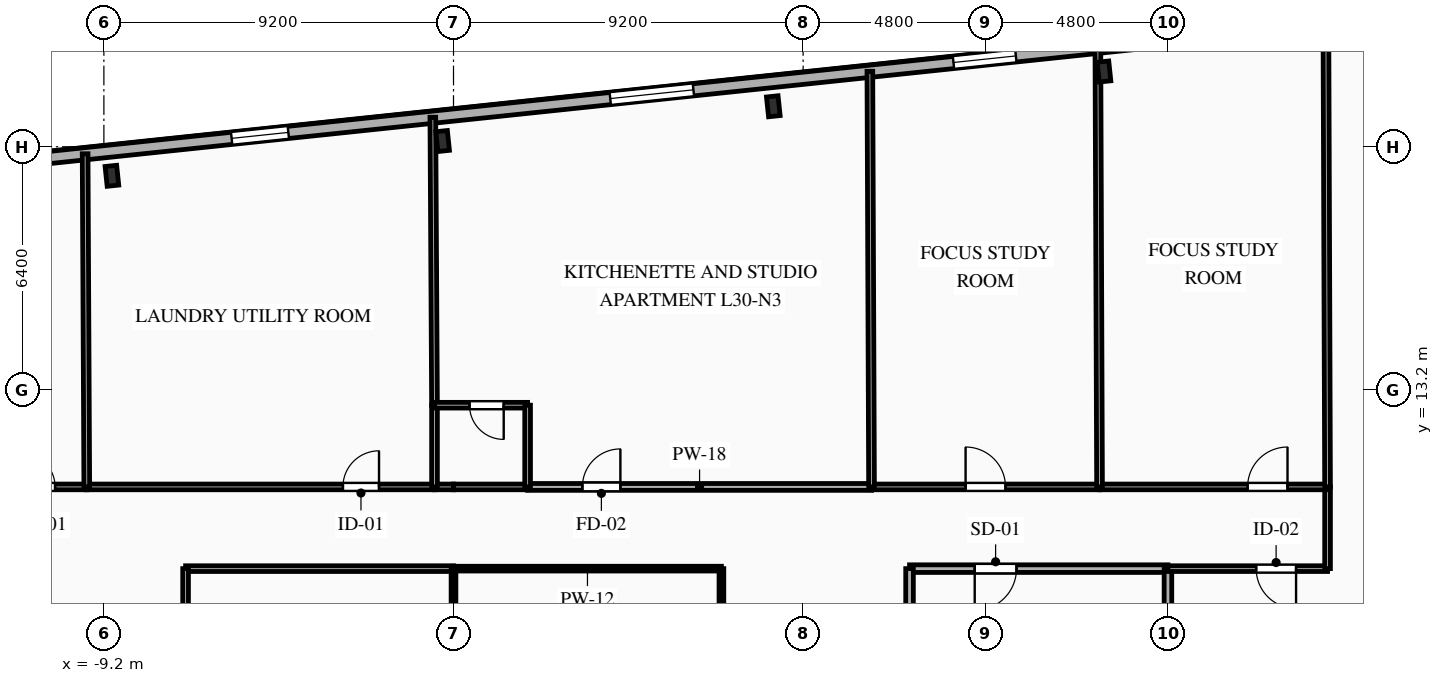
"""IFC4 building model, lengths in metres.
Left out: names, types, materials, properties, quantities, classifications, styles, units other than length and angle.
Written with IfcOpenShell. Run it as: python <this file> out.ifc"""

import sys

from ifc_helpers import new_model, si_unit, direction, frame, frame_2d, origin, origin_2d, place, context, subcontext, project, spatial, rectangle, i_section, extrude, element, fill, save


model = new_model("IFC4")
c1 = context("Model", 3, precision=1e-05, world=origin(), true_north=direction((0.0, 1.0)))
c2 = subcontext(c1, "Body", "Model", "MODEL_VIEW")
j1 = project(units=[si_unit("LENGTHUNIT", "METRE"), si_unit("PLANEANGLEUNIT", "RADIAN")], contexts=[c1])
p1 = place(None, origin())
s1 = spatial("IfcSite", under=j1, at=p1, CompositionType="ELEMENT")
p2 = place(p1, origin())
s2 = spatial("IfcBuilding", under=s1, at=p2, CompositionType="ELEMENT")
p3 = place(p2, frame((0.0, 0.0, 109.15)))
s3 = spatial("IfcBuildingStorey", under=s2, at=p3, CompositionType="ELEMENT", Elevation=109.15)
for number, where, z_axis, x_axis in (
    (1, (17.117, 21.58, 0.0), (0.0, 0.0, 1.0), (0.995, 0.105, 0.0)),
    (2, (8.415, 20.666, 0.0), (0.0, 0.0, 1.0), (0.995, 0.105, 0.0)),
    (3, (-0.287, 19.751, 0.0), (0.0, 0.0, 1.0), (0.995, 0.105, 0.0)),
    (4, (-8.989, 18.836, 0.0), (0.0, 0.0, 1.0), (0.995, 0.105, 0.0)),
):
    element("IfcColumn", number, at=place(p3, frame(where, z_axis=z_axis, x_axis=x_axis)), inside=s3, PredefinedType="COLUMN", context=c2, shape_type="SweptSolid", body=[
        extrude(i_section(OverallWidth=0.306, OverallDepth=0.524, WebThickness=0.021, FlangeThickness=0.04, FilletRadius=0.027, at=origin_2d()), origin(), (0.0, 0.0, 1.0), 3.35),
    ])
p4 = place(p3, frame((-27.107, 17.586, 0.0), z_axis=(0.0, 0.0, 1.0), x_axis=(0.994521628355, 0.104531003701, 0.0)))
e5 = element("IfcWall", 5, at=p4, inside=s3, PredefinedType="SOLIDWALL", context=c2, shape_type="SweptSolid", body=[
    extrude(rectangle(XDim=53.8, YDim=0.32, at=frame_2d((26.9, 0.0))), origin(), (0.0, 0.0, 1.0), 3.045),
])
p5 = place(p4, frame((1.532, 0.0, 0.85)))
e6 = element("IfcOpeningElement", 6, at=p5, cuts=e5, PredefinedType="OPENING", context=c2, shape_type="SweptSolid", body=[
    extrude(rectangle(XDim=1.5, YDim=1.85, at=frame_2d((0.75, 0.925))), frame((0.0, 0.17, 0.0), z_axis=(0.0, -1.0, 0.0), x_axis=(1.0, 0.0, 0.0)), (0.0, 0.0, 1.0), 0.34),
])
p6 = place(p4, frame((6.02, 0.0, 0.85)))
e7 = element("IfcOpeningElement", 7, at=p6, cuts=e5, PredefinedType="OPENING", context=c2, shape_type="SweptSolid", body=[
    extrude(rectangle(XDim=1.65, YDim=1.85, at=frame_2d((0.825, 0.925))), frame((0.0, 0.17, 0.0), z_axis=(0.0, -1.0, 0.0), x_axis=(1.0, 0.0, 0.0)), (0.0, 0.0, 1.0), 0.34),
])
p7 = place(p4, frame((11.584, 0.0, 0.85)))
e8 = element("IfcOpeningElement", 8, at=p7, cuts=e5, PredefinedType="OPENING", context=c2, shape_type="SweptSolid", body=[
    extrude(rectangle(XDim=1.65, YDim=1.85, at=frame_2d((0.825, 0.925))), frame((0.0, 0.17, 0.0), z_axis=(0.0, -1.0, 0.0), x_axis=(1.0, 0.0, 0.0)), (0.0, 0.0, 1.0), 0.34),
])
p8 = place(p4, frame((21.386, 0.0, 0.85)))
e9 = element("IfcOpeningElement", 9, at=p8, cuts=e5, PredefinedType="OPENING", context=c2, shape_type="SweptSolid", body=[
    extrude(rectangle(XDim=1.5, YDim=1.85, at=frame_2d((0.75, 0.925))), frame((0.0, 0.17, 0.0), z_axis=(0.0, -1.0, 0.0), x_axis=(1.0, 0.0, 0.0)), (0.0, 0.0, 1.0), 0.34),
])
p9 = place(p4, frame((31.404, 0.0, 0.85)))
e10 = element("IfcOpeningElement", 10, at=p9, cuts=e5, PredefinedType="OPENING", context=c2, shape_type="SweptSolid", body=[
    extrude(rectangle(XDim=2.2, YDim=1.85, at=frame_2d((1.1, 0.925))), frame((0.0, 0.17, 0.0), z_axis=(0.0, -1.0, 0.0), x_axis=(1.0, 0.0, 0.0)), (0.0, 0.0, 1.0), 0.34),
])
p10 = place(p4, frame((40.486, 0.0, 0.85)))
e11 = element("IfcOpeningElement", 11, at=p10, cuts=e5, PredefinedType="OPENING", context=c2, shape_type="SweptSolid", body=[
    extrude(rectangle(XDim=1.65, YDim=1.85, at=frame_2d((0.825, 0.925))), frame((0.0, 0.17, 0.0), z_axis=(0.0, -1.0, 0.0), x_axis=(1.0, 0.0, 0.0)), (0.0, 0.0, 1.0), 0.34),
])
p11 = place(p4, frame((46.53, 0.0, 0.85)))
e12 = element("IfcOpeningElement", 12, at=p11, cuts=e5, PredefinedType="OPENING", context=c2, shape_type="SweptSolid", body=[
    extrude(rectangle(XDim=1.65, YDim=1.85, at=frame_2d((0.825, 0.925))), frame((0.0, 0.17, 0.0), z_axis=(0.0, -1.0, 0.0), x_axis=(1.0, 0.0, 0.0)), (0.0, 0.0, 1.0), 0.34),
])
p12 = place(p4, frame((51.054, 0.0, 0.85)))
e13 = element("IfcOpeningElement", 13, at=p12, cuts=e5, PredefinedType="OPENING", context=c2, shape_type="SweptSolid", body=[
    extrude(rectangle(XDim=1.65, YDim=1.85, at=frame_2d((0.825, 0.925))), frame((0.0, 0.17, 0.0), z_axis=(0.0, -1.0, 0.0), x_axis=(1.0, 0.0, 0.0)), (0.0, 0.0, 1.0), 0.34),
])
p13 = place(p3, frame((18.8, 8.5, 0.0), z_axis=(0.0, 0.0, 1.0), x_axis=(-1.0, 0.0, 0.0)))
e14 = element("IfcWall", 14, at=p13, inside=s3, PredefinedType="PARTITIONING", context=c2, shape_type="SweptSolid", body=[
    extrude(rectangle(XDim=6.8, YDim=0.2, at=frame_2d((3.4, 0.0))), origin(), (0.0, 0.0, 1.0), 3.045),
])
p14 = place(p13, frame((3.985, 0.0, 0.0)))
e15 = element("IfcOpeningElement", 15, at=p14, cuts=e14, PredefinedType="OPENING", context=c2, shape_type="SweptSolid", body=[
    extrude(rectangle(XDim=1.1, YDim=2.15, at=frame_2d((0.55, 1.075))), frame((0.0, 0.11, 0.0), z_axis=(0.0, -1.0, 0.0), x_axis=(1.0, 0.0, 0.0)), (0.0, 0.0, 1.0), 0.22),
])
p15 = place(p3, frame((12.0, 8.5, 0.0), z_axis=(0.0, 0.0, 1.0), x_axis=(0.0, -1.0, 0.0)))
e16 = element("IfcWall", 16, at=p15, inside=s3, PredefinedType="PARTITIONING", context=c2, shape_type="SweptSolid", body=[
    extrude(rectangle(XDim=2.9, YDim=0.2, at=frame_2d((1.45, 0.0))), origin(), (0.0, 0.0, 1.0), 3.045),
])
p16 = place(p3, frame((18.8, 5.6, 0.0), z_axis=(0.0, 0.0, 1.0), x_axis=(0.0, 1.0, 0.0)))
e17 = element("IfcWall", 17, at=p16, inside=s3, PredefinedType="PARTITIONING", context=c2, shape_type="SweptSolid", body=[
    extrude(rectangle(XDim=2.9, YDim=0.2, at=frame_2d((1.45, 0.0))), origin(), (0.0, 0.0, 1.0), 2.53),
])
p17 = place(p3, frame((-12.0, 10.65, 0.0), z_axis=(0.0, 0.0, 1.0), x_axis=(1.0, 0.0, 0.0)))
e18 = element("IfcWall", 18, at=p17, inside=s3, PredefinedType="PLUMBINGWALL", context=c2, shape_type="SweptSolid", body=[
    extrude(rectangle(XDim=2.35, YDim=0.15, at=frame_2d((1.175, 0.0))), origin(), (0.0, 0.0, 1.0), 3.045),
])
p18 = place(p17, frame((0.616, 0.0, 0.0)))
e19 = element("IfcOpeningElement", 19, at=p18, cuts=e18, PredefinedType="OPENING", context=c2, shape_type="SweptSolid", body=[
    extrude(rectangle(XDim=0.9, YDim=2.1, at=frame_2d((0.45, 1.05))), frame((0.0, 0.085, 0.0), z_axis=(0.0, -1.0, 0.0), x_axis=(1.0, 0.0, 0.0)), (0.0, 0.0, 1.0), 0.17),
])
p19 = place(p3, frame((-9.65, 10.65, 0.0), z_axis=(0.0, 0.0, 1.0), x_axis=(1.0, 0.0, 0.0)))
e20 = element("IfcWall", 20, at=p19, inside=s3, PredefinedType="PARTITIONING", context=c2, shape_type="SweptSolid", body=[
    extrude(rectangle(XDim=9.15, YDim=0.15, at=frame_2d((4.575, 0.0))), origin(), (0.0, 0.0, 1.0), 3.045),
])
p20 = place(p19, frame((6.74, 0.0, 0.0)))
e21 = element("IfcOpeningElement", 21, at=p20, cuts=e20, PredefinedType="OPENING", context=c2, shape_type="SweptSolid", body=[
    extrude(rectangle(XDim=0.95, YDim=2.1, at=frame_2d((0.475, 1.05))), frame((0.0, 0.085, 0.0), z_axis=(0.0, -1.0, 0.0), x_axis=(1.0, 0.0, 0.0)), (0.0, 0.0, 1.0), 0.17),
])
p21 = place(p3, frame((-0.5, 10.65, 0.0), z_axis=(0.0, 0.0, 1.0), x_axis=(1.0, 0.0, 0.0)))
e22 = element("IfcWall", 22, at=p21, inside=s3, PredefinedType="PLUMBINGWALL", context=c2, shape_type="SweptSolid", body=[
    extrude(rectangle(XDim=0.5, YDim=0.15, at=frame_2d((0.25, 0.0))), origin(), (0.0, 0.0, 1.0), 3.045),
])
p22 = place(p3, frame((0.0, 8.5, 0.0), z_axis=(0.0, 0.0, 1.0), x_axis=(-1.0, 0.0, 0.0)))
e23 = element("IfcWall", 23, at=p22, inside=s3, PredefinedType="PARTITIONING", context=c2, shape_type="SweptSolid", body=[
    extrude(rectangle(XDim=7.05, YDim=0.15, at=frame_2d((3.525, 0.0))), origin(), (0.0, 0.0, 1.0), 3.045),
])
p23 = place(p3, frame((23.0, 8.5, 0.0), z_axis=(0.0, 0.0, 1.0), x_axis=(-1.0, 0.0, 0.0)))
e24 = element("IfcWall", 24, at=p23, inside=s3, PredefinedType="PARTITIONING", context=c2, shape_type="SweptSolid", body=[
    extrude(rectangle(XDim=4.2, YDim=0.15, at=frame_2d((2.1, 0.0))), origin(), (0.0, 0.0, 1.0), 3.045),
])
p24 = place(p23, frame((0.829, 0.0, 0.0)))
e25 = element("IfcOpeningElement", 25, at=p24, cuts=e24, PredefinedType="OPENING", context=c2, shape_type="SweptSolid", body=[
    extrude(rectangle(XDim=1.05, YDim=2.15, at=frame_2d((0.525, 1.075))), frame((0.0, 0.085, 0.0), z_axis=(0.0, -1.0, 0.0), x_axis=(1.0, 0.0, 0.0)), (0.0, 0.0, 1.0), 0.17),
])
p25 = place(p3, frame((23.0, 10.65, 0.0), z_axis=(0.0, 0.0, 1.0), x_axis=(0.0, -1.0, 0.0)))
e26 = element("IfcWall", 26, at=p25, inside=s3, PredefinedType="PARTITIONING", context=c2, shape_type="SweptSolid", body=[
    extrude(rectangle(XDim=2.15, YDim=0.15, at=frame_2d((1.075, 0.0))), origin(), (0.0, 0.0, 1.0), 3.045),
])
p26 = place(p3, frame((1.95, 10.65, 0.0), z_axis=(0.0, 0.0, 1.0), x_axis=(1.0, 0.0, 0.0)))
e27 = element("IfcWall", 27, at=p26, inside=s3, PredefinedType="PARTITIONING", context=c2, shape_type="SweptSolid", body=[
    extrude(rectangle(XDim=9.05, YDim=0.18, at=frame_2d((4.525, 0.0))), origin(), (0.0, 0.0, 1.0), 3.045),
])
p27 = place(p26, frame((1.441, 0.0, 0.0)))
e28 = element("IfcOpeningElement", 28, at=p27, cuts=e27, PredefinedType="OPENING", context=c2, shape_type="SweptSolid", body=[
    extrude(rectangle(XDim=1.0, YDim=2.15, at=frame_2d((0.5, 1.075))), frame((0.0, 0.1, 0.0), z_axis=(0.0, -1.0, 0.0), x_axis=(1.0, 0.0, 0.0)), (0.0, 0.0, 1.0), 0.2),
])
p28 = place(p3, frame((0.0, 10.65, 0.0), z_axis=(0.0, 0.0, 1.0), x_axis=(1.0, 0.0, 0.0)))
e29 = element("IfcWall", 29, at=p28, inside=s3, PredefinedType="PLUMBINGWALL", context=c2, shape_type="SweptSolid", body=[
    extrude(rectangle(XDim=1.95, YDim=0.15, at=frame_2d((0.975, 0.0))), origin(), (0.0, 0.0, 1.0), 3.045),
])
p29 = place(p3, frame((11.0, 10.65, 0.0), z_axis=(0.0, 0.0, 1.0), x_axis=(1.0, 0.0, 0.0)))
e30 = element("IfcWall", 30, at=p29, inside=s3, PredefinedType="PARTITIONING", context=c2, shape_type="SweptSolid", body=[
    extrude(rectangle(XDim=6.0, YDim=0.15, at=frame_2d((3.0, 0.0))), origin(), (0.0, 0.0, 1.0), 3.045),
])
p30 = place(p29, frame((2.475, 0.0, 0.0)))
e31 = element("IfcOpeningElement", 31, at=p30, cuts=e30, PredefinedType="OPENING", context=c2, shape_type="SweptSolid", body=[
    extrude(rectangle(XDim=1.05, YDim=2.15, at=frame_2d((0.525, 1.075))), frame((0.0, 0.085, 0.0), z_axis=(0.0, -1.0, 0.0), x_axis=(1.0, 0.0, 0.0)), (0.0, 0.0, 1.0), 0.17),
])
p31 = place(p3, frame((17.0, 10.65, 0.0), z_axis=(0.0, 0.0, 1.0), x_axis=(1.0, 0.0, 0.0)))
e32 = element("IfcWall", 32, at=p31, inside=s3, PredefinedType="PARTITIONING", context=c2, shape_type="SweptSolid", body=[
    extrude(rectangle(XDim=6.0, YDim=0.15, at=frame_2d((3.0, 0.0))), origin(), (0.0, 0.0, 1.0), 3.045),
])
p32 = place(p31, frame((3.896, 0.0, 0.0)))
e33 = element("IfcOpeningElement", 33, at=p32, cuts=e32, PredefinedType="OPENING", context=c2, shape_type="SweptSolid", body=[
    extrude(rectangle(XDim=1.05, YDim=2.15, at=frame_2d((0.525, 1.075))), frame((0.0, 0.085, 0.0), z_axis=(0.0, -1.0, 0.0), x_axis=(1.0, 0.0, 0.0)), (0.0, 0.0, 1.0), 0.17),
])
p33 = place(p3, frame((7.05, 8.5, 0.0), z_axis=(0.0, 0.0, 1.0), x_axis=(-1.0, 0.0, 0.0)))
e34 = element("IfcWall", 34, at=p33, inside=s3, PredefinedType="PARTITIONING", context=c2, shape_type="SweptSolid", body=[
    extrude(rectangle(XDim=7.05, YDim=0.125, at=frame_2d((3.525, 0.0))), origin(), (0.0, 0.0, 1.0), 3.045),
])
p34 = place(p3, frame((-7.05, 8.5, 0.0), z_axis=(0.0, 0.0, 1.0), x_axis=(0.0, -1.0, 0.0)))
e35 = element("IfcWall", 35, at=p34, inside=s3, PredefinedType="PARTITIONING", context=c2, shape_type="SweptSolid", body=[
    extrude(rectangle(XDim=14.1, YDim=0.15, at=frame_2d((7.05, 0.0))), origin(), (0.0, 0.0, 1.0), 3.045),
])
p35 = place(p34, frame((8.074, 0.0, 0.0)))
e36 = element("IfcOpeningElement", 36, at=p35, cuts=e35, PredefinedType="OPENING", context=c2, shape_type="SweptSolid", body=[
    extrude(rectangle(XDim=0.95, YDim=2.1, at=frame_2d((0.475, 1.05))), frame((0.0, 0.085, 0.0), z_axis=(0.0, -1.0, 0.0), x_axis=(1.0, 0.0, 0.0)), (0.0, 0.0, 1.0), 0.17),
])
p36 = place(p3, frame((7.05, -5.6, 0.0), z_axis=(0.0, 0.0, 1.0), x_axis=(0.0, 1.0, 0.0)))
e37 = element("IfcWall", 37, at=p36, inside=s3, PredefinedType="PARTITIONING", context=c2, shape_type="SweptSolid", body=[
    extrude(rectangle(XDim=14.1, YDim=0.125, at=frame_2d((7.05, 0.0))), origin(), (0.0, 0.0, 1.0), 3.045),
])
p37 = place(p36, frame((5.076, 0.0, 0.0)))
e38 = element("IfcOpeningElement", 38, at=p37, cuts=e37, PredefinedType="OPENING", context=c2, shape_type="SweptSolid", body=[
    extrude(rectangle(XDim=0.95, YDim=2.1, at=frame_2d((0.475, 1.05))), frame((0.0, 0.073, 0.0), z_axis=(0.0, -1.0, 0.0), x_axis=(1.0, 0.0, 0.0)), (0.0, 0.0, 1.0), 0.145),
])
p38 = place(p3, frame((23.0, 10.65, 0.0), z_axis=(0.0, 0.0, 1.0), x_axis=(-0.0036027147, 0.999993510202, 0.0)))
e39 = element("IfcWall", 39, at=p38, inside=s3, PredefinedType="PARTITIONING", context=c2, shape_type="SweptSolid", body=[
    extrude(rectangle(XDim=12.198, YDim=0.15, at=frame_2d((6.099, 0.0))), origin(), (0.0, 0.0, 1.0), 3.045),
])
p39 = place(p3, frame((-9.694, 19.416, 0.0), z_axis=(0.0, 0.0, 1.0), x_axis=(0.005013026743, -0.999987434702, 0.0)))
e40 = element("IfcWall", 40, at=p39, inside=s3, PredefinedType="PLUMBINGWALL", context=c2, shape_type="SweptSolid", body=[
    extrude(rectangle(XDim=8.766, YDim=0.15, at=frame_2d((4.383, 0.0))), origin(), (0.0, 0.0, 1.0), 3.045),
])
p40 = place(p3, frame((-0.544, 20.378, 0.0), z_axis=(0.0, 0.0, 1.0), x_axis=(0.005799245221, -0.999983184236, 0.0)))
e41 = element("IfcWall", 41, at=p40, inside=s3, PredefinedType="PARTITIONING", context=c2, shape_type="SweptSolid", body=[
    extrude(rectangle(XDim=7.578, YDim=0.15, at=frame_2d((3.789, 0.0))), origin(), (0.0, 0.0, 1.0), 3.045),
])
p41 = place(p3, frame((-0.5, 12.8, 0.0), z_axis=(0.0, 0.0, 1.0), x_axis=(0.0, -1.0, 0.0)))
e42 = element("IfcWall", 42, at=p41, inside=s3, PredefinedType="PLUMBINGWALL", context=c2, shape_type="SweptSolid", body=[
    extrude(rectangle(XDim=2.15, YDim=0.15, at=frame_2d((1.075, 0.0))), origin(), (0.0, 0.0, 1.0), 3.045),
])
p42 = place(p3, frame((1.95, 12.8, 0.0), z_axis=(0.0, 0.0, 1.0), x_axis=(-1.0, 0.0, 0.0)))
e43 = element("IfcWall", 43, at=p42, inside=s3, PredefinedType="PLUMBINGWALL", context=c2, shape_type="SweptSolid", body=[
    extrude(rectangle(XDim=2.45, YDim=0.15, at=frame_2d((1.225, 0.0))), origin(), (0.0, 0.0, 1.0), 3.045),
])
p43 = place(p42, frame((0.629, 0.0, 0.0)))
e44 = element("IfcOpeningElement", 44, at=p43, cuts=e43, PredefinedType="OPENING", context=c2, shape_type="SweptSolid", body=[
    extrude(rectangle(XDim=0.9, YDim=2.1, at=frame_2d((0.45, 1.05))), frame((0.0, 0.085, 0.0), z_axis=(0.0, -1.0, 0.0), x_axis=(1.0, 0.0, 0.0)), (0.0, 0.0, 1.0), 0.17),
])
p44 = place(p3, frame((1.95, 10.65, 0.0), z_axis=(0.0, 0.0, 1.0), x_axis=(0.0, 1.0, 0.0)))
e45 = element("IfcWall", 45, at=p44, inside=s3, PredefinedType="PLUMBINGWALL", context=c2, shape_type="SweptSolid", body=[
    extrude(rectangle(XDim=2.15, YDim=0.15, at=frame_2d((1.075, 0.0))), origin(), (0.0, 0.0, 1.0), 3.045),
])
p45 = place(p3, frame((10.956, 21.586, 0.0), z_axis=(0.0, 0.0, 1.0), x_axis=(0.004018183473, -0.999991927068, 0.0)))
e46 = element("IfcWall", 46, at=p45, inside=s3, PredefinedType="PARTITIONING", context=c2, shape_type="SweptSolid", body=[
    extrude(rectangle(XDim=10.937, YDim=0.15, at=frame_2d((5.468, 0.0))), origin(), (0.0, 0.0, 1.0), 3.045),
])
p46 = place(p3, frame((16.956, 22.217, 0.0), z_axis=(0.0, 0.0, 1.0), x_axis=(0.003799124105, -0.999992783302, 0.0)))
e47 = element("IfcWall", 47, at=p46, inside=s3, PredefinedType="PARTITIONING", context=c2, shape_type="SweptSolid", body=[
    extrude(rectangle(XDim=11.567, YDim=0.15, at=frame_2d((5.784, 0.0))), origin(), (0.0, 0.0, 1.0), 2.53),
])
p47 = place(p3, frame((0.0, 8.5, 0.0), z_axis=(0.0, 0.0, 1.0), x_axis=(0.0, -1.0, 0.0)))
e48 = element("IfcWall", 48, at=p47, inside=s3, PredefinedType="PARTITIONING", context=c2, shape_type="SweptSolid", body=[
    extrude(rectangle(XDim=14.1, YDim=0.125, at=frame_2d((7.05, 0.0))), origin(), (0.0, 0.0, 1.0), 3.045),
])
p48 = place(p8, origin())
e49 = element("IfcWindow", 49, at=p48, inside=s3, PartitioningType="SINGLE_PANEL", PredefinedType="WINDOW", context=c2, shape_type="SweptSolid", body=[
    extrude(rectangle(XDim=1.5, YDim=1.85, at=frame_2d((0.75, 0.925))), frame((0.0, 0.03, 0.0), z_axis=(0.0, -1.0, 0.0), x_axis=(1.0, 0.0, 0.0)), (0.0, 0.0, 1.0), 0.06),
])
fill(e9, e49)
p49 = place(p9, origin())
e50 = element("IfcWindow", 50, at=p49, inside=s3, PartitioningType="SINGLE_PANEL", PredefinedType="WINDOW", context=c2, shape_type="SweptSolid", body=[
    extrude(rectangle(XDim=2.2, YDim=1.85, at=frame_2d((1.1, 0.925))), frame((0.0, 0.03, 0.0), z_axis=(0.0, -1.0, 0.0), x_axis=(1.0, 0.0, 0.0)), (0.0, 0.0, 1.0), 0.06),
])
fill(e10, e50)
p50 = place(p10, origin())
e51 = element("IfcWindow", 51, at=p50, inside=s3, PartitioningType="SINGLE_PANEL", PredefinedType="WINDOW", context=c2, shape_type="SweptSolid", body=[
    extrude(rectangle(XDim=1.65, YDim=1.85, at=frame_2d((0.825, 0.925))), frame((0.0, 0.03, 0.0), z_axis=(0.0, -1.0, 0.0), x_axis=(1.0, 0.0, 0.0)), (0.0, 0.0, 1.0), 0.06),
])
fill(e11, e51)
p51 = place(p14, origin())
e52 = element("IfcDoor", 52, at=p51, inside=s3, OperationType="SINGLE_SWING_RIGHT", PredefinedType="DOOR", context=c2, shape_type="SweptSolid", body=[
    extrude(rectangle(XDim=1.1, YDim=2.15, at=frame_2d((0.55, 1.075))), frame((0.0, 0.025, 0.0), z_axis=(0.0, -1.0, 0.0), x_axis=(1.0, 0.0, 0.0)), (0.0, 0.0, 1.0), 0.05),
])
fill(e15, e52)
p52 = place(p18, origin())
e53 = element("IfcDoor", 53, at=p52, inside=s3, OperationType="SINGLE_SWING_LEFT", PredefinedType="DOOR", context=c2, shape_type="SweptSolid", body=[
    extrude(rectangle(XDim=0.9, YDim=2.1, at=frame_2d((0.45, 1.05))), frame((0.0, 0.025, 0.0), z_axis=(0.0, -1.0, 0.0), x_axis=(1.0, 0.0, 0.0)), (0.0, 0.0, 1.0), 0.05),
])
fill(e19, e53)
p53 = place(p20, origin())
e54 = element("IfcDoor", 54, at=p53, inside=s3, OperationType="SINGLE_SWING_RIGHT", PredefinedType="DOOR", context=c2, shape_type="SweptSolid", body=[
    extrude(rectangle(XDim=0.95, YDim=2.1, at=frame_2d((0.475, 1.05))), frame((0.0, 0.025, 0.0), z_axis=(0.0, -1.0, 0.0), x_axis=(1.0, 0.0, 0.0)), (0.0, 0.0, 1.0), 0.05),
])
fill(e21, e54)
p54 = place(p24, origin())
e55 = element("IfcDoor", 55, at=p54, inside=s3, OperationType="SINGLE_SWING_LEFT", PredefinedType="DOOR", context=c2, shape_type="SweptSolid", body=[
    extrude(rectangle(XDim=1.05, YDim=2.15, at=frame_2d((0.525, 1.075))), frame((0.0, 0.025, 0.0), z_axis=(0.0, -1.0, 0.0), x_axis=(1.0, 0.0, 0.0)), (0.0, 0.0, 1.0), 0.05),
])
fill(e25, e55)
p55 = place(p27, origin())
e56 = element("IfcDoor", 56, at=p55, inside=s3, OperationType="SINGLE_SWING_RIGHT", PredefinedType="DOOR", context=c2, shape_type="SweptSolid", body=[
    extrude(rectangle(XDim=1.0, YDim=2.15, at=frame_2d((0.5, 1.075))), frame((0.0, 0.025, 0.0), z_axis=(0.0, -1.0, 0.0), x_axis=(1.0, 0.0, 0.0)), (0.0, 0.0, 1.0), 0.05),
])
fill(e28, e56)
p56 = place(p30, origin())
e57 = element("IfcDoor", 57, at=p56, inside=s3, OperationType="SINGLE_SWING_LEFT", PredefinedType="DOOR", context=c2, shape_type="SweptSolid", body=[
    extrude(rectangle(XDim=1.05, YDim=2.15, at=frame_2d((0.525, 1.075))), frame((0.0, 0.025, 0.0), z_axis=(0.0, -1.0, 0.0), x_axis=(1.0, 0.0, 0.0)), (0.0, 0.0, 1.0), 0.05),
])
fill(e31, e57)
p57 = place(p32, origin())
e58 = element("IfcDoor", 58, at=p57, inside=s3, OperationType="SINGLE_SWING_RIGHT", PredefinedType="DOOR", context=c2, shape_type="SweptSolid", body=[
    extrude(rectangle(XDim=1.05, YDim=2.15, at=frame_2d((0.525, 1.075))), frame((0.0, 0.025, 0.0), z_axis=(0.0, -1.0, 0.0), x_axis=(1.0, 0.0, 0.0)), (0.0, 0.0, 1.0), 0.05),
])
fill(e33, e58)
p58 = place(p43, origin())
e59 = element("IfcDoor", 59, at=p58, inside=s3, OperationType="SINGLE_SWING_LEFT", PredefinedType="DOOR", context=c2, shape_type="SweptSolid", body=[
    extrude(rectangle(XDim=0.9, YDim=2.1, at=frame_2d((0.45, 1.05))), frame((0.0, 0.025, 0.0), z_axis=(0.0, -1.0, 0.0), x_axis=(1.0, 0.0, 0.0)), (0.0, 0.0, 1.0), 0.05),
])
fill(e44, e59)
save(model, sys.argv[1])
